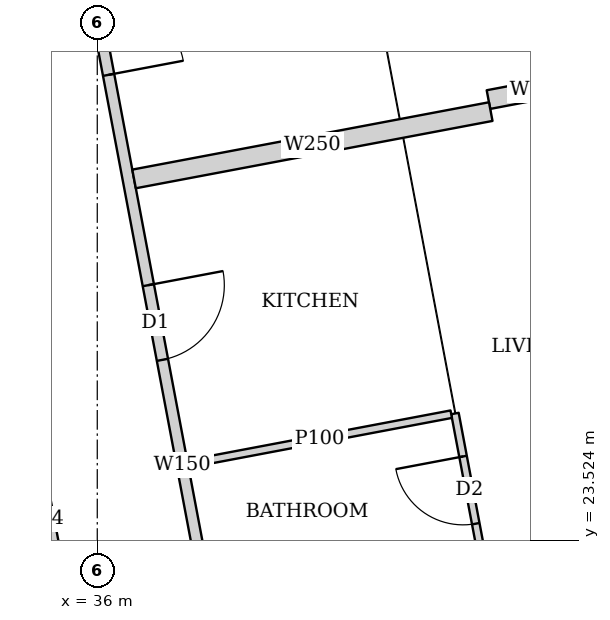
"""IFC4 building model, lengths in metres.
Left out: names, types, materials, properties, quantities, classifications, styles, units other than length and angle.
Written with IfcOpenShell. Run it as: python <this file> out.ifc"""

import sys

from ifc_helpers import new_model, si_unit, direction, frame, frame_2d, origin, place, context, subcontext, project, spatial, rectangle, extrude, element, fill, save


model = new_model("IFC4")
c1 = context("Model", 3, precision=1e-05, world=origin(), true_north=direction((0.0, 1.0)))
c2 = subcontext(c1, "Body", "Model", "MODEL_VIEW")
j1 = project(units=[si_unit("LENGTHUNIT", "METRE"), si_unit("PLANEANGLEUNIT", "RADIAN")], contexts=[c1])
p1 = place(None, origin())
s1 = spatial("IfcSite", under=j1, at=p1, CompositionType="ELEMENT")
p2 = place(p1, origin())
s2 = spatial("IfcBuilding", under=s1, at=p2, CompositionType="ELEMENT")
p3 = place(p2, frame((0.0, 0.0, 277.85)))
s3 = spatial("IfcBuildingStorey", under=s2, at=p3, CompositionType="ELEMENT", Elevation=277.85)
p4 = place(p3, frame((33.781, 42.186, 0.0), z_axis=(0.0, 0.0, 1.0), x_axis=(0.185593518645, -0.9826266055, 0.0)))
e1 = element("IfcWall", 1, at=p4, inside=s3, PredefinedType="SOLIDWALL", context=c2, shape_type="SweptSolid", body=[
    extrude(rectangle(XDim=35.961, YDim=0.15, at=frame_2d((17.98, 0.0))), origin(), (0.0, 0.0, 1.0), 2.5),
])
p5 = place(p4, frame((11.76, 0.0, 0.0)))
e2 = element("IfcOpeningElement", 2, at=p5, cuts=e1, PredefinedType="OPENING", context=c2, shape_type="SweptSolid", body=[
    extrude(rectangle(XDim=1.0, YDim=2.1, at=frame_2d((0.5, 1.05))), frame((0.0, 0.085, 0.0), z_axis=(0.0, -1.0, 0.0), x_axis=(1.0, 0.0, 0.0)), (0.0, 0.0, 1.0), 0.17),
])
p6 = place(p4, frame((15.576, 0.0, 0.0)))
e3 = element("IfcOpeningElement", 3, at=p6, cuts=e1, PredefinedType="OPENING", context=c2, shape_type="SweptSolid", body=[
    extrude(rectangle(XDim=1.0, YDim=2.1, at=frame_2d((0.5, 1.05))), frame((0.0, 0.085, 0.0), z_axis=(0.0, -1.0, 0.0), x_axis=(1.0, 0.0, 0.0)), (0.0, 0.0, 1.0), 0.17),
])
p7 = place(p4, frame((30.502, 0.0, 0.0)))
e4 = element("IfcOpeningElement", 4, at=p7, cuts=e1, PredefinedType="OPENING", context=c2, shape_type="SweptSolid", body=[
    extrude(rectangle(XDim=1.0, YDim=2.1, at=frame_2d((0.5, 1.05))), frame((0.0, 0.085, 0.0), z_axis=(0.0, -1.0, 0.0), x_axis=(1.0, 0.0, 0.0)), (0.0, 0.0, 1.0), 0.17),
])
p8 = place(p3, frame((40.706, 25.192, 0.0), z_axis=(0.0, 0.0, 1.0), x_axis=(0.185629824463, -0.982619747547, 0.0)))
e5 = element("IfcWall", 5, at=p8, inside=s3, PredefinedType="PARTITIONING", context=c2, shape_type="SweptSolid", body=[
    extrude(rectangle(XDim=9.659, YDim=0.1, at=frame_2d((4.83, 0.0))), origin(), (0.0, 0.0, 1.0), 2.5),
])
p9 = place(p8, frame((0.575, 0.0, 0.0)))
e6 = element("IfcOpeningElement", 6, at=p9, cuts=e5, PredefinedType="OPENING", context=c2, shape_type="SweptSolid", body=[
    extrude(rectangle(XDim=0.9, YDim=2.1, at=frame_2d((0.45, 1.05))), frame((0.0, 0.06, 0.0), z_axis=(0.0, -1.0, 0.0), x_axis=(1.0, 0.0, 0.0)), (0.0, 0.0, 1.0), 0.12),
])
p10 = place(p8, frame((4.166, 0.0, 0.0)))
e7 = element("IfcOpeningElement", 7, at=p10, cuts=e5, PredefinedType="OPENING", context=c2, shape_type="SweptSolid", body=[
    extrude(rectangle(XDim=0.9, YDim=2.1, at=frame_2d((0.45, 1.05))), frame((0.0, 0.06, 0.0), z_axis=(0.0, -1.0, 0.0), x_axis=(1.0, 0.0, 0.0)), (0.0, 0.0, 1.0), 0.12),
])
p11 = place(p8, frame((2.483, 0.0, 0.0)))
e8 = element("IfcOpeningElement", 8, at=p11, cuts=e5, PredefinedType="OPENING", context=c2, shape_type="SweptSolid", body=[
    extrude(rectangle(XDim=0.9, YDim=2.1, at=frame_2d((0.45, 1.05))), frame((0.0, 0.06, 0.0), z_axis=(0.0, -1.0, 0.0), x_axis=(1.0, 0.0, 0.0)), (0.0, 0.0, 1.0), 0.12),
])
p12 = place(p8, frame((6.074, 0.0, 0.0)))
e9 = element("IfcOpeningElement", 9, at=p12, cuts=e5, PredefinedType="OPENING", context=c2, shape_type="SweptSolid", body=[
    extrude(rectangle(XDim=0.9, YDim=2.1, at=frame_2d((0.45, 1.05))), frame((0.0, 0.06, 0.0), z_axis=(0.0, -1.0, 0.0), x_axis=(1.0, 0.0, 0.0)), (0.0, 0.0, 1.0), 0.12),
])
p13 = place(p3, frame((40.657, 25.183, 0.0), z_axis=(0.0, 0.0, 1.0), x_axis=(-0.982585626838, -0.185810349366, 0.0)))
e10 = element("IfcWall", 10, at=p13, inside=s3, PredefinedType="PARTITIONING", context=c2, shape_type="SweptSolid", body=[
    extrude(rectangle(XDim=3.525, YDim=0.1, at=frame_2d((1.763, 0.0))), origin(), (0.0, 0.0, 1.0), 3.5),
])
p14 = place(p3, frame((42.456, 29.57, 0.0), z_axis=(0.0, 0.0, 1.0), x_axis=(-0.982517742323, -0.18616897169, 0.0)))
e11 = element("IfcWall", 11, at=p14, inside=s3, PredefinedType="SOLIDWALL", context=c2, shape_type="SweptSolid", body=[
    extrude(rectangle(XDim=1.332, YDim=0.25, at=frame_2d((0.666, 0.0))), origin(), (0.0, 0.0, 1.0), 2.5),
])
p15 = place(p3, frame((41.177, 29.164, 0.0), z_axis=(0.0, 0.0, 1.0), x_axis=(-0.982642846239, -0.185507511263, 0.0)))
e12 = element("IfcWall", 12, at=p15, inside=s3, PredefinedType="SOLIDWALL", context=c2, shape_type="SweptSolid", body=[
    extrude(rectangle(XDim=4.776, YDim=0.25, at=frame_2d((2.388, 0.0))), origin(), (0.0, 0.0, 1.0), 2.5),
])
p16 = place(p3, frame((37.947, 10.163, 0.0), z_axis=(0.0, 0.0, 1.0), x_axis=(-0.185572770922, 0.982630523998, 0.0)))
e13 = element("IfcWall", 13, at=p16, inside=s3, PredefinedType="PARTITIONING", context=c2, shape_type="SweptSolid", body=[
    extrude(rectangle(XDim=25.111, YDim=0.125, at=frame_2d((12.556, 0.0))), origin(), (0.0, 0.0, 1.0), 2.5),
])
p17 = place(p16, frame((0.708, 0.0, 0.0)))
e14 = element("IfcOpeningElement", 14, at=p17, cuts=e13, PredefinedType="OPENING", context=c2, shape_type="SweptSolid", body=[
    extrude(rectangle(XDim=1.0, YDim=2.1, at=frame_2d((0.5, 1.05))), frame((0.0, 0.073, 0.0), z_axis=(0.0, -1.0, 0.0), x_axis=(1.0, 0.0, 0.0)), (0.0, 0.0, 1.0), 0.145),
])
p18 = place(p16, frame((5.9, 0.0, 0.0)))
e15 = element("IfcOpeningElement", 15, at=p18, cuts=e13, PredefinedType="OPENING", context=c2, shape_type="SweptSolid", body=[
    extrude(rectangle(XDim=1.0, YDim=2.1, at=frame_2d((0.5, 1.05))), frame((0.0, 0.073, 0.0), z_axis=(0.0, -1.0, 0.0), x_axis=(1.0, 0.0, 0.0)), (0.0, 0.0, 1.0), 0.145),
])
p19 = place(p16, frame((13.378, 0.0, 0.0)))
e16 = element("IfcOpeningElement", 16, at=p19, cuts=e13, PredefinedType="OPENING", context=c2, shape_type="SweptSolid", body=[
    extrude(rectangle(XDim=1.0, YDim=2.1, at=frame_2d((0.5, 1.05))), frame((0.0, 0.073, 0.0), z_axis=(0.0, -1.0, 0.0), x_axis=(1.0, 0.0, 0.0)), (0.0, 0.0, 1.0), 0.145),
])
p20 = place(p16, frame((21.15, 0.0, 0.0)))
e17 = element("IfcOpeningElement", 17, at=p20, cuts=e13, PredefinedType="OPENING", context=c2, shape_type="SweptSolid", body=[
    extrude(rectangle(XDim=1.0, YDim=2.1, at=frame_2d((0.5, 1.05))), frame((0.0, 0.073, 0.0), z_axis=(0.0, -1.0, 0.0), x_axis=(1.0, 0.0, 0.0)), (0.0, 0.0, 1.0), 0.145),
])
p21 = place(p5, origin())
e18 = element("IfcDoor", 18, at=p21, inside=s3, OperationType="SINGLE_SWING_RIGHT", PredefinedType="DOOR", context=c2, shape_type="SweptSolid", body=[
    extrude(rectangle(XDim=1.0, YDim=2.1, at=frame_2d((0.5, 1.05))), frame((0.0, 0.025, 0.0), z_axis=(0.0, -1.0, 0.0), x_axis=(1.0, 0.0, 0.0)), (0.0, 0.0, 1.0), 0.05),
])
fill(e2, e18)
p22 = place(p9, origin())
e19 = element("IfcDoor", 19, at=p22, inside=s3, OperationType="SINGLE_SWING_RIGHT", PredefinedType="DOOR", context=c2, shape_type="SweptSolid", body=[
    extrude(rectangle(XDim=0.9, YDim=2.1, at=frame_2d((0.45, 1.05))), frame((0.0, 0.025, 0.0), z_axis=(0.0, -1.0, 0.0), x_axis=(1.0, 0.0, 0.0)), (0.0, 0.0, 1.0), 0.05),
])
fill(e6, e19)
p23 = place(p6, origin())
e20 = element("IfcDoor", 20, at=p23, inside=s3, OperationType="SINGLE_SWING_LEFT", PredefinedType="DOOR", context=c2, shape_type="SweptSolid", body=[
    extrude(rectangle(XDim=1.0, YDim=2.1, at=frame_2d((0.5, 1.05))), frame((0.0, 0.025, 0.0), z_axis=(0.0, -1.0, 0.0), x_axis=(1.0, 0.0, 0.0)), (0.0, 0.0, 1.0), 0.05),
])
fill(e3, e20)
p24 = place(p19, origin())
e21 = element("IfcDoor", 21, at=p24, inside=s3, OperationType="SINGLE_SWING_LEFT", PredefinedType="DOOR", context=c2, shape_type="SweptSolid", body=[
    extrude(rectangle(XDim=1.0, YDim=2.1, at=frame_2d((0.5, 1.05))), frame((0.0, 0.025, 0.0), z_axis=(0.0, -1.0, 0.0), x_axis=(1.0, 0.0, 0.0)), (0.0, 0.0, 1.0), 0.05),
])
fill(e16, e21)
save(model, sys.argv[1])
